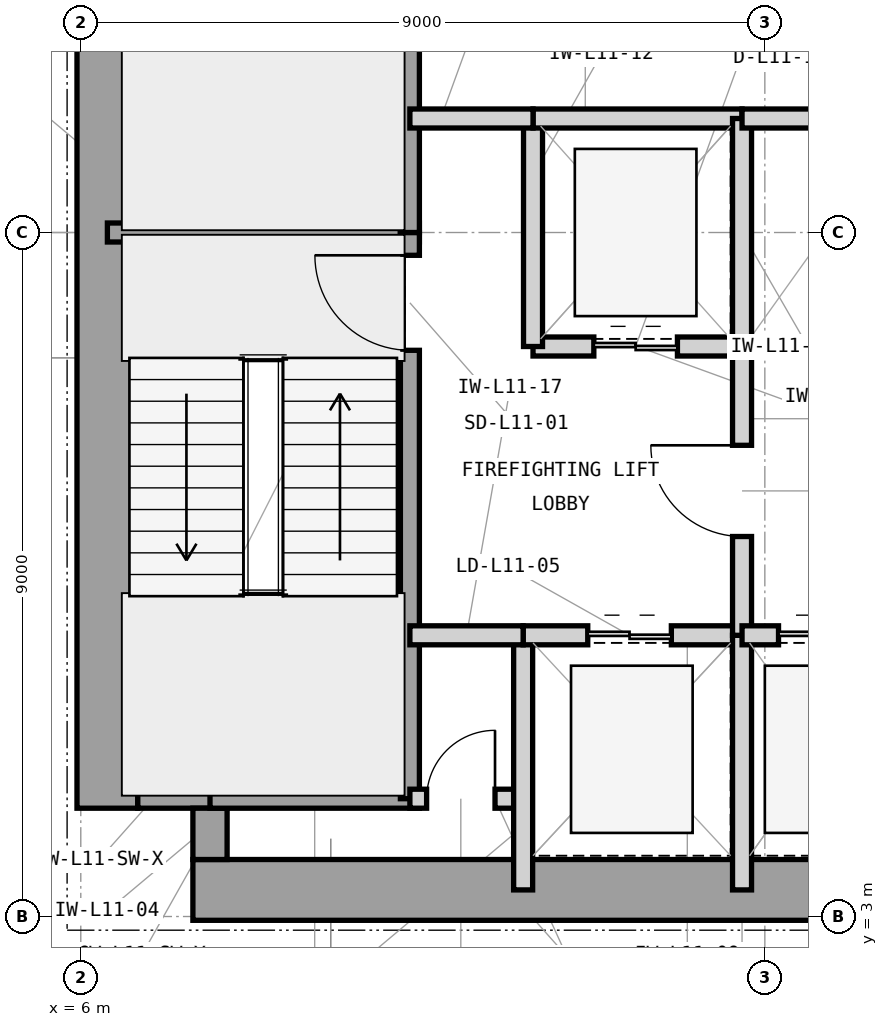
"""IFC4 building model, lengths in metres.
Left out: names, types, materials, properties, quantities, classifications, styles, units other than length and angle.
Written with IfcOpenShell. Run it as: python <this file> out.ifc"""

import sys

from ifc_helpers import new_model, si_unit, direction, frame, frame_2d, origin, place, context, subcontext, project, spatial, rectangle, extrude, element, fill, save


model = new_model("IFC4")
c1 = context("Model", 3, precision=1e-05, world=origin(), true_north=direction((0.0, 1.0)))
c2 = subcontext(c1, "Body", "Model", "MODEL_VIEW")
j1 = project(units=[si_unit("LENGTHUNIT", "METRE"), si_unit("PLANEANGLEUNIT", "RADIAN")], contexts=[c1])
p1 = place(None, origin())
s1 = spatial("IfcSite", under=j1, at=p1, CompositionType="ELEMENT")
p2 = place(p1, origin())
s2 = spatial("IfcBuilding", under=s1, at=p2, CompositionType="ELEMENT")
p3 = place(p2, frame((0.0, 0.0, 51.0)))
s3 = spatial("IfcBuildingStorey", under=s2, at=p3, CompositionType="ELEMENT", Elevation=51.0)
p4 = place(p3, frame((7.475, 3.35, 0.0), z_axis=(0.0, 0.0, 1.0), x_axis=(1.0, 0.0, 0.0)))
e1 = element("IfcWall", 1, at=p4, inside=s3, PredefinedType="SHEAR", context=c2, shape_type="SweptSolid", body=[
    extrude(rectangle(XDim=16.575, YDim=0.8, at=frame_2d((8.288, 0.0))), origin(), (0.0, 0.0, 1.0), 4.2),
])
p5 = place(p3, frame((6.35, 4.425, 0.0), z_axis=(0.0, 0.0, 1.0), x_axis=(0.0, 1.0, 0.0)))
e2 = element("IfcWall", 2, at=p5, inside=s3, PredefinedType="SHEAR", context=c2, shape_type="SweptSolid", body=[
    extrude(rectangle(XDim=15.15, YDim=0.8, at=frame_2d((7.575, 0.0))), origin(), (0.0, 0.0, 1.0), 4.2),
])
p6 = place(p3, frame((6.75, 4.65, 0.0), z_axis=(0.0, 0.0, 1.0), x_axis=(1.0, 0.0, 0.0)))
e3 = element("IfcWall", 3, at=p6, inside=s3, PredefinedType="SHEAR", context=c2, shape_type="SweptSolid", body=[
    extrude(rectangle(XDim=1.175, YDim=0.45, at=frame_2d((0.587, 0.0))), origin(), (0.0, 0.0, 1.0), 4.2),
])
p7 = place(p3, frame((7.7, 3.75, 0.0), z_axis=(0.0, 0.0, 1.0), x_axis=(0.0, 1.0, 0.0)))
e4 = element("IfcWall", 4, at=p7, inside=s3, PredefinedType="SHEAR", context=c2, shape_type="SweptSolid", body=[
    extrude(rectangle(XDim=0.675, YDim=0.45, at=frame_2d((0.337, 0.0))), origin(), (0.0, 0.0, 1.0), 4.2),
])
p8 = place(p3, frame((6.35, 12.0, 0.0), z_axis=(0.0, 0.0, 1.0), x_axis=(1.0, 0.0, 0.0)))
e5 = element("IfcWall", 5, at=p8, inside=s3, PredefinedType="SHEAR", context=c2, shape_type="SweptSolid", body=[
    extrude(rectangle(XDim=4.105, YDim=0.25, at=frame_2d((2.052, 0.0))), origin(), (0.0, 0.0, 1.0), 4.2),
])
p9 = place(p3, frame((7.7, 4.55, 0.0), z_axis=(0.0, 0.0, 1.0), x_axis=(1.0, 0.0, 0.0)))
e6 = element("IfcWall", 6, at=p9, inside=s3, PredefinedType="SHEAR", context=c2, shape_type="SweptSolid", body=[
    extrude(rectangle(XDim=2.755, YDim=0.25, at=frame_2d((1.377, 0.0))), origin(), (0.0, 0.0, 1.0), 4.2),
])
p10 = place(p3, frame((10.33, 4.55, 0.0), z_axis=(0.0, 0.0, 1.0), x_axis=(0.0, 1.0, 0.0)))
e7 = element("IfcWall", 7, at=p10, inside=s3, PredefinedType="SHEAR", context=c2, shape_type="SweptSolid", body=[
    extrude(rectangle(XDim=7.45, YDim=0.25, at=frame_2d((3.725, 0.0))), origin(), (0.0, 0.0, 1.0), 4.2),
])
p11 = place(p10, frame((5.9, 0.0, 0.0)))
e8 = element("IfcOpeningElement", 8, at=p11, cuts=e7, PredefinedType="OPENING", context=c2, shape_type="SweptSolid", body=[
    extrude(rectangle(XDim=1.25, YDim=2.2, at=frame_2d((0.625, 1.1))), frame((0.0, 0.135, 0.0), z_axis=(0.0, -1.0, 0.0), x_axis=(1.0, 0.0, 0.0)), (0.0, 0.0, 1.0), 0.27),
])
p12 = place(p3, frame((10.33, 12.0, 0.0), z_axis=(0.0, 0.0, 1.0), x_axis=(0.0, 1.0, 0.0)))
e9 = element("IfcWall", 9, at=p12, inside=s3, PredefinedType="SHEAR", context=c2, shape_type="SweptSolid", body=[
    extrude(rectangle(XDim=7.45, YDim=0.25, at=frame_2d((3.725, 0.0))), origin(), (0.0, 0.0, 1.0), 4.2),
])
p13 = place(p12, frame((5.85, 0.0, 0.0)))
e10 = element("IfcOpeningElement", 10, at=p13, cuts=e9, PredefinedType="OPENING", context=c2, shape_type="SweptSolid", body=[
    extrude(rectangle(XDim=1.25, YDim=2.2, at=frame_2d((0.625, 1.1))), frame((0.0, 0.135, 0.0), z_axis=(0.0, -1.0, 0.0), x_axis=(1.0, 0.0, 0.0)), (0.0, 0.0, 1.0), 0.27),
])
p14 = place(p3, frame((10.33, 4.55, 0.0), z_axis=(0.0, 0.0, 1.0), x_axis=(1.0, 0.0, 0.0)))
e11 = element("IfcWall", 11, at=p14, inside=s3, PredefinedType="PARTITIONING", context=c2, shape_type="SweptSolid", body=[
    extrude(rectangle(XDim=1.49, YDim=0.25, at=frame_2d((0.745, 0.0))), origin(), (0.0, 0.0, 1.0), 3.97),
])
p15 = place(p14, frame((0.22, 0.0, 0.0)))
e12 = element("IfcOpeningElement", 12, at=p15, cuts=e11, PredefinedType="OPENING", context=c2, shape_type="SweptSolid", body=[
    extrude(rectangle(XDim=0.9, YDim=2.1, at=frame_2d((0.45, 1.05))), frame((0.0, 0.135, 0.0), z_axis=(0.0, -1.0, 0.0), x_axis=(1.0, 0.0, 0.0)), (0.0, 0.0, 1.0), 0.27),
])
p16 = place(p3, frame((11.82, 3.35, 0.0), z_axis=(0.0, 0.0, 1.0), x_axis=(0.0, 1.0, 0.0)))
e13 = element("IfcWall", 13, at=p16, inside=s3, PredefinedType="PARTITIONING", context=c2, shape_type="SweptSolid", body=[
    extrude(rectangle(XDim=3.35, YDim=0.25, at=frame_2d((1.675, 0.0))), origin(), (0.0, 0.0, 1.0), 3.97),
])
p17 = place(p3, frame((11.82, 6.7, 0.0), z_axis=(0.0, 0.0, 1.0), x_axis=(1.0, 0.0, 0.0)))
e14 = element("IfcWall", 14, at=p17, inside=s3, PredefinedType="PARTITIONING", context=c2, shape_type="SweptSolid", body=[
    extrude(rectangle(XDim=2.88, YDim=0.25, at=frame_2d((1.44, 0.0))), origin(), (0.0, 0.0, 1.0), 3.426),
])
p18 = place(p17, frame((0.85, 0.0, 0.0)))
e15 = element("IfcOpeningElement", 15, at=p18, cuts=e14, PredefinedType="OPENING", context=c2, shape_type="SweptSolid", body=[
    extrude(rectangle(XDim=1.1, YDim=2.25, at=frame_2d((0.55, 1.125))), frame((0.0, 0.135, 0.0), z_axis=(0.0, -1.0, 0.0), x_axis=(1.0, 0.0, 0.0)), (0.0, 0.0, 1.0), 0.27),
])
p19 = place(p3, frame((14.7, 3.35, 0.0), z_axis=(0.0, 0.0, 1.0), x_axis=(0.0, 1.0, 0.0)))
e16 = element("IfcWall", 16, at=p19, inside=s3, PredefinedType="PARTITIONING", context=c2, shape_type="SweptSolid", body=[
    extrude(rectangle(XDim=3.35, YDim=0.25, at=frame_2d((1.675, 0.0))), origin(), (0.0, 0.0, 1.0), 3.97),
])
p20 = place(p3, frame((11.95, 10.5, 0.0), z_axis=(0.0, 0.0, 1.0), x_axis=(1.0, 0.0, 0.0)))
e17 = element("IfcWall", 17, at=p20, inside=s3, PredefinedType="PARTITIONING", context=c2, shape_type="SweptSolid", body=[
    extrude(rectangle(XDim=2.75, YDim=0.25, at=frame_2d((1.375, 0.0))), origin(), (0.0, 0.0, 1.0), 3.426),
])
p21 = place(p20, frame((0.8, 0.0, 0.0)))
e18 = element("IfcOpeningElement", 18, at=p21, cuts=e17, PredefinedType="OPENING", context=c2, shape_type="SweptSolid", body=[
    extrude(rectangle(XDim=1.1, YDim=2.25, at=frame_2d((0.55, 1.125))), frame((0.0, 0.135, 0.0), z_axis=(0.0, -1.0, 0.0), x_axis=(1.0, 0.0, 0.0)), (0.0, 0.0, 1.0), 0.27),
])
p22 = place(p3, frame((11.95, 10.5, 0.0), z_axis=(0.0, 0.0, 1.0), x_axis=(0.0, 1.0, 0.0)))
e19 = element("IfcWall", 19, at=p22, inside=s3, PredefinedType="PARTITIONING", context=c2, shape_type="SweptSolid", body=[
    extrude(rectangle(XDim=3.0, YDim=0.25, at=frame_2d((1.5, 0.0))), origin(), (0.0, 0.0, 1.0), 3.97),
])
p23 = place(p3, frame((11.95, 13.5, 0.0), z_axis=(0.0, 0.0, 1.0), x_axis=(1.0, 0.0, 0.0)))
e20 = element("IfcWall", 20, at=p23, inside=s3, PredefinedType="PARTITIONING", context=c2, shape_type="SweptSolid", body=[
    extrude(rectangle(XDim=2.75, YDim=0.25, at=frame_2d((1.375, 0.0))), origin(), (0.0, 0.0, 1.0), 3.426),
])
p24 = place(p3, frame((14.7, 10.5, 0.0), z_axis=(0.0, 0.0, 1.0), x_axis=(0.0, 1.0, 0.0)))
e21 = element("IfcWall", 21, at=p24, inside=s3, PredefinedType="PARTITIONING", context=c2, shape_type="SweptSolid", body=[
    extrude(rectangle(XDim=3.0, YDim=0.25, at=frame_2d((1.5, 0.0))), origin(), (0.0, 0.0, 1.0), 3.97),
])
p25 = place(p3, frame((14.7, 6.7, 0.0), z_axis=(0.0, 0.0, 1.0), x_axis=(0.0, 1.0, 0.0)))
e22 = element("IfcWall", 22, at=p25, inside=s3, PredefinedType="PARTITIONING", context=c2, shape_type="SweptSolid", body=[
    extrude(rectangle(XDim=3.8, YDim=0.25, at=frame_2d((1.9, 0.0))), origin(), (0.0, 0.0, 1.0), 3.97),
])
p26 = place(p25, frame((1.3, 0.0, 0.0)))
e23 = element("IfcOpeningElement", 23, at=p26, cuts=e22, PredefinedType="OPENING", context=c2, shape_type="SweptSolid", body=[
    extrude(rectangle(XDim=1.2, YDim=2.2, at=frame_2d((0.6, 1.1))), frame((0.0, 0.135, 0.0), z_axis=(0.0, -1.0, 0.0), x_axis=(1.0, 0.0, 0.0)), (0.0, 0.0, 1.0), 0.27),
])
p27 = place(p3, frame((10.33, 13.5, 0.0), z_axis=(0.0, 0.0, 1.0), x_axis=(1.0, 0.0, 0.0)))
e24 = element("IfcWall", 24, at=p27, inside=s3, PredefinedType="PARTITIONING", context=c2, shape_type="SweptSolid", body=[
    extrude(rectangle(XDim=1.62, YDim=0.25, at=frame_2d((0.81, 0.0))), origin(), (0.0, 0.0, 1.0), 3.426),
])
p28 = place(p3, frame((10.33, 6.7, 0.0), z_axis=(0.0, 0.0, 1.0), x_axis=(1.0, 0.0, 0.0)))
e25 = element("IfcWall", 25, at=p28, inside=s3, PredefinedType="PARTITIONING", context=c2, shape_type="SweptSolid", body=[
    extrude(rectangle(XDim=1.49, YDim=0.25, at=frame_2d((0.745, 0.0))), origin(), (0.0, 0.0, 1.0), 3.426),
])
p29 = place(p3, frame((14.7, 6.7, 0.0), z_axis=(0.0, 0.0, 1.0), x_axis=(1.0, 0.0, 0.0)))
e26 = element("IfcWall", 26, at=p29, inside=s3, PredefinedType="PARTITIONING", context=c2, shape_type="SweptSolid", body=[
    extrude(rectangle(XDim=2.15, YDim=0.25, at=frame_2d((1.075, 0.0))), origin(), (0.0, 0.0, 1.0), 3.426),
])
p30 = place(p29, frame((0.48, 0.0, 0.0)))
e27 = element("IfcOpeningElement", 27, at=p30, cuts=e26, PredefinedType="OPENING", context=c2, shape_type="SweptSolid", body=[
    extrude(rectangle(XDim=1.15, YDim=2.25, at=frame_2d((0.575, 1.125))), frame((0.0, 0.135, 0.0), z_axis=(0.0, -1.0, 0.0), x_axis=(1.0, 0.0, 0.0)), (0.0, 0.0, 1.0), 0.27),
])
p31 = place(p3, frame((14.7, 10.5, 0.0), z_axis=(0.0, 0.0, 1.0), x_axis=(1.0, 0.0, 0.0)))
e28 = element("IfcWall", 28, at=p31, inside=s3, PredefinedType="PARTITIONING", context=c2, shape_type="SweptSolid", body=[
    extrude(rectangle(XDim=2.15, YDim=0.25, at=frame_2d((1.075, 0.0))), origin(), (0.0, 0.0, 1.0), 3.426),
])
p32 = place(p3, frame((14.7, 13.5, 0.0), z_axis=(0.0, 0.0, 1.0), x_axis=(1.0, 0.0, 0.0)))
e29 = element("IfcWall", 29, at=p32, inside=s3, PredefinedType="PARTITIONING", context=c2, shape_type="SweptSolid", body=[
    extrude(rectangle(XDim=8.95, YDim=0.25, at=frame_2d((4.475, 0.0))), origin(), (0.0, 0.0, 1.0), 3.426),
])
p33 = place(p11, origin())
e30 = element("IfcDoor", 30, at=p33, inside=s3, OperationType="SINGLE_SWING_RIGHT", PredefinedType="DOOR", context=c2, shape_type="SweptSolid", body=[
    extrude(rectangle(XDim=1.25, YDim=2.2, at=frame_2d((0.625, 1.1))), frame((0.0, 0.025, 0.0), z_axis=(0.0, -1.0, 0.0), x_axis=(1.0, 0.0, 0.0)), (0.0, 0.0, 1.0), 0.05),
])
fill(e8, e30)
p34 = place(p15, origin())
e31 = element("IfcDoor", 31, at=p34, inside=s3, OperationType="SINGLE_SWING_RIGHT", PredefinedType="TRAPDOOR", context=c2, shape_type="SweptSolid", body=[
    extrude(rectangle(XDim=0.9, YDim=2.1, at=frame_2d((0.45, 1.05))), frame((0.0, 0.025, 0.0), z_axis=(0.0, -1.0, 0.0), x_axis=(1.0, 0.0, 0.0)), (0.0, 0.0, 1.0), 0.05),
])
fill(e12, e31)
p35 = place(p18, origin())
e32 = element("IfcDoor", 32, at=p35, inside=s3, OperationType="DOUBLE_DOOR_SLIDING", PredefinedType="DOOR", context=c2, shape_type="SweptSolid", body=[
    extrude(rectangle(XDim=1.1, YDim=2.25, at=frame_2d((0.55, 1.125))), frame((0.0, 0.025, 0.0), z_axis=(0.0, -1.0, 0.0), x_axis=(1.0, 0.0, 0.0)), (0.0, 0.0, 1.0), 0.05),
])
fill(e15, e32)
p36 = place(p21, origin())
e33 = element("IfcDoor", 33, at=p36, inside=s3, OperationType="DOUBLE_DOOR_SLIDING", PredefinedType="DOOR", context=c2, shape_type="SweptSolid", body=[
    extrude(rectangle(XDim=1.1, YDim=2.25, at=frame_2d((0.55, 1.125))), frame((0.0, 0.025, 0.0), z_axis=(0.0, -1.0, 0.0), x_axis=(1.0, 0.0, 0.0)), (0.0, 0.0, 1.0), 0.05),
])
fill(e18, e33)
p37 = place(p26, origin())
e34 = element("IfcDoor", 34, at=p37, inside=s3, OperationType="SINGLE_SWING_RIGHT", PredefinedType="DOOR", context=c2, shape_type="SweptSolid", body=[
    extrude(rectangle(XDim=1.2, YDim=2.2, at=frame_2d((0.6, 1.1))), frame((0.0, 0.025, 0.0), z_axis=(0.0, -1.0, 0.0), x_axis=(1.0, 0.0, 0.0)), (0.0, 0.0, 1.0), 0.05),
])
fill(e23, e34)
p38 = place(p30, origin())
e35 = element("IfcDoor", 35, at=p38, inside=s3, OperationType="DOUBLE_DOOR_SLIDING", PredefinedType="DOOR", context=c2, shape_type="SweptSolid", body=[
    extrude(rectangle(XDim=1.15, YDim=2.25, at=frame_2d((0.575, 1.125))), frame((0.0, 0.025, 0.0), z_axis=(0.0, -1.0, 0.0), x_axis=(1.0, 0.0, 0.0)), (0.0, 0.0, 1.0), 0.05),
])
fill(e27, e35)
save(model, sys.argv[1])
